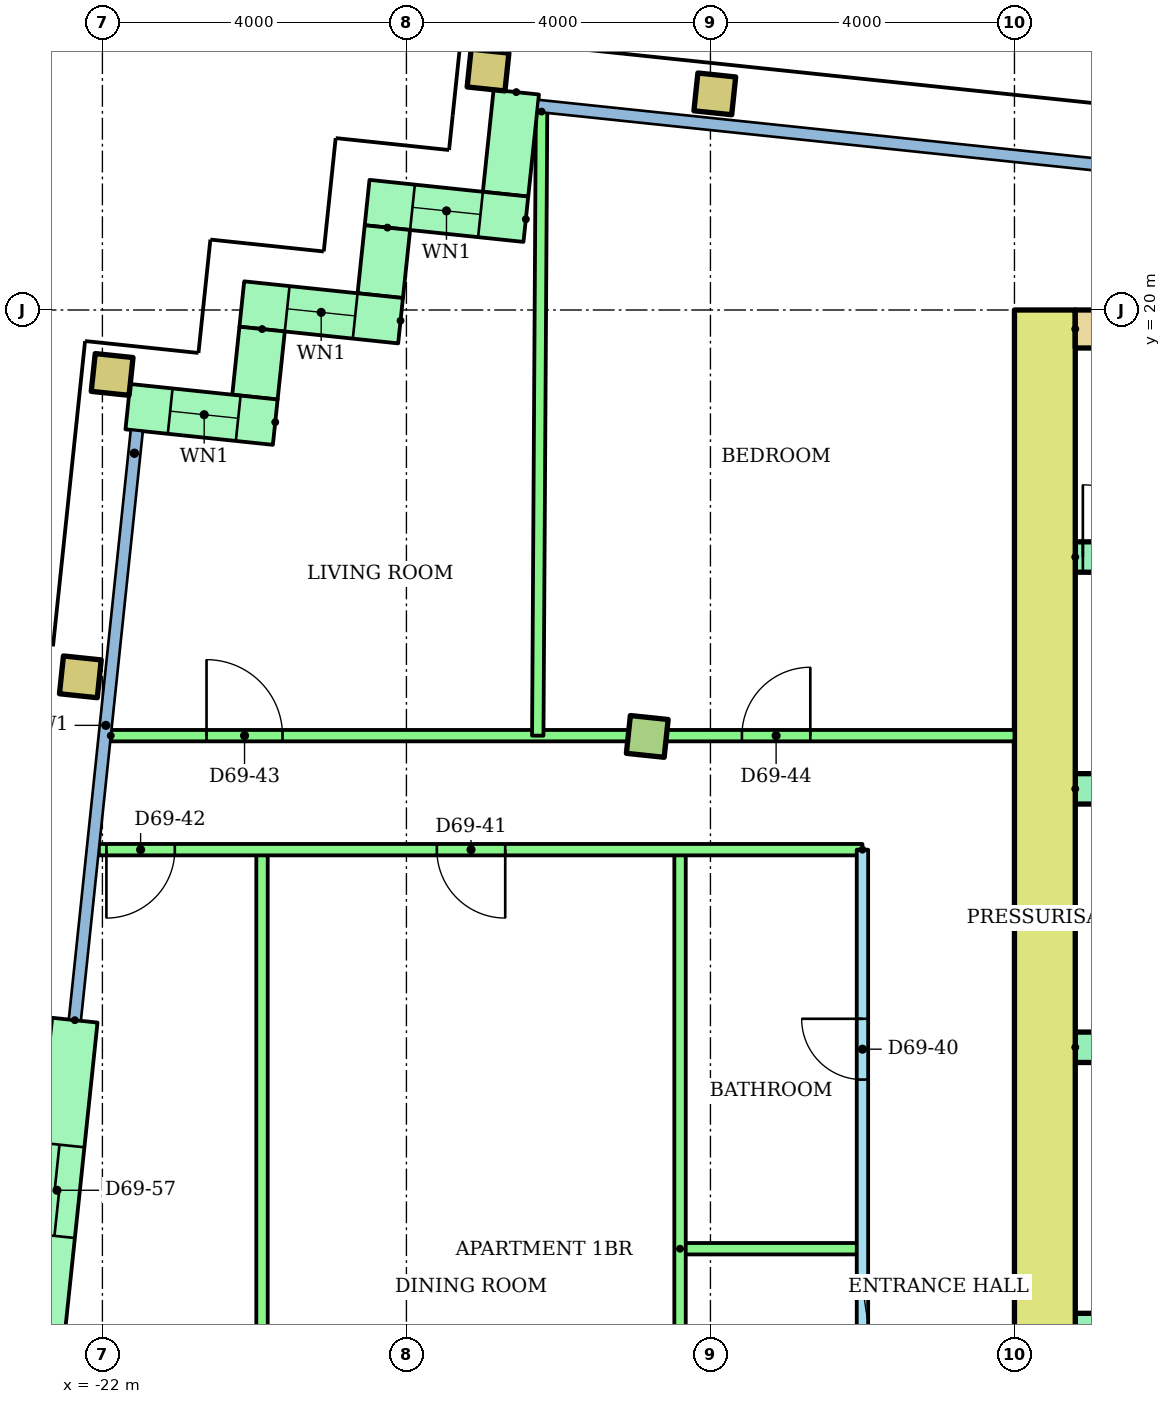
"""IFC4 building model, lengths in metres.
Left out: names, types, materials, properties, quantities, classifications, styles, units other than length and angle.
Written with IfcOpenShell. Run it as: python <this file> out.ifc"""

import sys

from ifc_helpers import new_model, si_unit, direction, frame, frame_2d, origin, origin_2d, place, context, subcontext, project, spatial, rectangle, hollow_rectangle, extrude, element, fill, save


model = new_model("IFC4")
c1 = context("Model", 3, precision=1e-05, world=origin(), true_north=direction((0.0, 1.0)))
c2 = subcontext(c1, "Body", "Model", "MODEL_VIEW")
j1 = project(units=[si_unit("LENGTHUNIT", "METRE"), si_unit("PLANEANGLEUNIT", "RADIAN")], contexts=[c1])
p1 = place(None, origin())
s1 = spatial("IfcSite", under=j1, at=p1, CompositionType="ELEMENT")
p2 = place(p1, origin())
s2 = spatial("IfcBuilding", under=s1, at=p2, CompositionType="ELEMENT")
p3 = place(p2, frame((0.0, 0.0, 265.9)))
s3 = spatial("IfcBuildingStorey", under=s2, at=p3, CompositionType="ELEMENT", Elevation=265.9)
p4 = place(p3, frame((-22.29, 15.174, 0.0), z_axis=(0.0, 0.0, 1.0), x_axis=(0.994521895368, -0.104528463268, 0.0)))
e1 = element("IfcColumn", 1, at=p4, inside=s3, PredefinedType="COLUMN", context=c2, shape_type="SweptSolid", body=[
    extrude(hollow_rectangle(XDim=0.5, YDim=0.5, WallThickness=0.025, at=origin_2d()), origin(), (0.0, 0.0, 1.0), 3.2),
])
p5 = place(p3, frame((-14.831, 14.39, 0.0), z_axis=(0.0, 0.0, 1.0), x_axis=(0.994521895368, -0.104528463268, 0.0)))
e2 = element("IfcColumn", 2, at=p5, inside=s3, PredefinedType="COLUMN", context=c2, shape_type="SweptSolid", body=[
    extrude(rectangle(XDim=0.5, YDim=0.5, at=origin_2d()), origin(), (0.0, 0.0, 1.0), 3.2),
])
for number, where, z_axis, x_axis in (
    (3, (-21.872, 19.152, 0.0), (0.0, 0.0, 1.0), (0.995, -0.105, 0.0)),
    (4, (-16.926, 23.157, 0.0), (0.0, 0.0, 1.0), (0.995, -0.105, 0.0)),
    (5, (-13.943, 22.843, 0.0), (0.0, 0.0, 1.0), (0.995, -0.105, 0.0)),
):
    element("IfcColumn", number, at=place(p3, frame(where, z_axis=z_axis, x_axis=x_axis)), inside=s3, PredefinedType="COLUMN", context=c2, shape_type="SweptSolid", body=[
        extrude(hollow_rectangle(XDim=0.5, YDim=0.5, WallThickness=0.025, at=origin_2d()), origin(), (0.0, 0.0, 1.0), 3.2),
    ])
p6 = place(p3, frame((-16.555, 22.866, 0.0), z_axis=(0.0, 0.0, 1.0), x_axis=(-0.104515354875, -0.994523273029, 0.0)))
e6 = element("IfcWall", 6, at=p6, inside=s3, PredefinedType="STANDARD", context=c2, shape_type="SweptSolid", body=[
    extrude(rectangle(XDim=1.35, YDim=0.6, at=frame_2d((0.675, 0.0))), origin(), (0.0, 0.0, 1.0), 2.92),
])
p7 = place(p3, frame((-16.429, 21.194, 0.0), z_axis=(0.0, 0.0, 1.0), x_axis=(-0.994522640205, 0.104521376379, 0.0)))
e7 = element("IfcWall", 7, at=p7, inside=s3, PredefinedType="STANDARD", context=c2, shape_type="SweptSolid", body=[
    extrude(rectangle(XDim=2.1, YDim=0.6, at=frame_2d((1.05, 0.0))), origin(), (0.0, 0.0, 1.0), 2.92),
])
p8 = place(p7, frame((0.6, 0.0, 0.9)))
e8 = element("IfcOpeningElement", 8, at=p8, cuts=e7, PredefinedType="OPENING", context=c2, shape_type="SweptSolid", body=[
    extrude(rectangle(XDim=0.9, YDim=1.5, at=frame_2d((0.45, 0.75))), frame((0.0, 0.31, 0.0), z_axis=(0.0, -1.0, 0.0), x_axis=(1.0, 0.0, 0.0)), (0.0, 0.0, 1.0), 0.62),
])
p9 = place(p3, frame((-18.25, 21.084, 0.0), z_axis=(0.0, 0.0, 1.0), x_axis=(-0.104416541099, -0.994533652495, 0.0)))
e9 = element("IfcWall", 9, at=p9, inside=s3, PredefinedType="STANDARD", context=c2, shape_type="SweptSolid", body=[
    extrude(rectangle(XDim=0.9, YDim=0.6, at=frame_2d((0.45, 0.0))), origin(), (0.0, 0.0, 1.0), 2.92),
])
p10 = place(p3, frame((-18.077, 19.859, 0.0), z_axis=(0.0, 0.0, 1.0), x_axis=(-0.994522640205, 0.104521376379, 0.0)))
e10 = element("IfcWall", 10, at=p10, inside=s3, PredefinedType="STANDARD", context=c2, shape_type="SweptSolid", body=[
    extrude(rectangle(XDim=2.1, YDim=0.6, at=frame_2d((1.05, 0.0))), origin(), (0.0, 0.0, 1.0), 2.92),
])
p11 = place(p10, frame((0.6, 0.0, 0.9)))
e11 = element("IfcOpeningElement", 11, at=p11, cuts=e10, PredefinedType="OPENING", context=c2, shape_type="SweptSolid", body=[
    extrude(rectangle(XDim=0.9, YDim=1.5, at=frame_2d((0.45, 0.75))), frame((0.0, 0.31, 0.0), z_axis=(0.0, -1.0, 0.0), x_axis=(1.0, 0.0, 0.0)), (0.0, 0.0, 1.0), 0.62),
])
p12 = place(p3, frame((-19.899, 19.749, 0.0), z_axis=(0.0, 0.0, 1.0), x_axis=(-0.104741284723, -0.994499503909, 0.0)))
e12 = element("IfcWall", 12, at=p12, inside=s3, PredefinedType="STANDARD", context=c2, shape_type="SweptSolid", body=[
    extrude(rectangle(XDim=0.9, YDim=0.6, at=frame_2d((0.45, 0.0))), origin(), (0.0, 0.0, 1.0), 2.92),
])
p13 = place(p3, frame((-19.726, 18.524, 0.0), z_axis=(0.0, 0.0, 1.0), x_axis=(-0.994534226826, 0.104411070641, 0.0)))
e13 = element("IfcWall", 13, at=p13, inside=s3, PredefinedType="STANDARD", context=c2, shape_type="SweptSolid", body=[
    extrude(rectangle(XDim=1.95, YDim=0.6, at=frame_2d((0.975, 0.0))), origin(), (0.0, 0.0, 1.0), 2.92),
])
p14 = place(p13, frame((0.49, 0.0, 0.9)))
e14 = element("IfcOpeningElement", 14, at=p14, cuts=e13, PredefinedType="OPENING", context=c2, shape_type="SweptSolid", body=[
    extrude(rectangle(XDim=0.9, YDim=1.5, at=frame_2d((0.45, 0.75))), frame((0.0, 0.31, 0.0), z_axis=(0.0, -1.0, 0.0), x_axis=(1.0, 0.0, 0.0)), (0.0, 0.0, 1.0), 0.62),
])
p15 = place(p3, frame((-22.363, 10.657, 0.0), z_axis=(0.0, 0.0, 1.0), x_axis=(-0.104492739125, -0.994525649478, 0.0)))
e15 = element("IfcWall", 15, at=p15, inside=s3, PredefinedType="STANDARD", context=c2, shape_type="SweptSolid", body=[
    extrude(rectangle(XDim=4.5, YDim=0.6, at=frame_2d((2.25, 0.0))), origin(), (0.0, 0.0, 1.0), 2.92),
])
p16 = place(p15, frame((1.65, 0.0, 0.0)))
e16 = element("IfcOpeningElement", 16, at=p16, cuts=e15, PredefinedType="OPENING", context=c2, shape_type="SweptSolid", body=[
    extrude(rectangle(XDim=1.2, YDim=2.1, at=frame_2d((0.6, 1.05))), frame((0.0, 0.31, 0.0), z_axis=(0.0, -1.0, 0.0), x_axis=(1.0, 0.0, 0.0)), (0.0, 0.0, 1.0), 0.62),
])
p17 = place(p3, frame((-9.6, 6.4, 0.0), z_axis=(0.0, 0.0, 1.0), x_axis=(0.0, 1.0, 0.0)))
e17 = element("IfcWall", 17, at=p17, inside=s3, PredefinedType="SHEAR", context=c2, shape_type="SweptSolid", body=[
    extrude(rectangle(XDim=13.6, YDim=0.8, at=frame_2d((6.8, 0.0))), origin(), (0.0, 0.0, 1.0), 2.92),
])
p18 = place(p3, frame((-9.2, 19.75, 0.0)))
e18 = element("IfcWall", 18, at=p18, inside=s3, PredefinedType="SHEAR", context=c2, shape_type="SweptSolid", body=[
    extrude(rectangle(XDim=18.4, YDim=0.5, at=frame_2d((9.2, 0.0))), origin(), (0.0, 0.0, 1.0), 2.92),
])
p19 = place(p3, frame((-9.2, 6.6, 0.0)))
e19 = element("IfcWall", 19, at=p19, inside=s3, PredefinedType="SHEAR", context=c2, shape_type="SweptSolid", body=[
    extrude(rectangle(XDim=18.4, YDim=0.4, at=frame_2d((9.2, 0.0))), origin(), (0.0, 0.0, 1.0), 2.92),
])
p20 = place(p19, frame((8.3, 0.0, 0.0)))
e20 = element("IfcOpeningElement", 20, at=p20, cuts=e19, PredefinedType="OPENING", context=c2, shape_type="SweptSolid", body=[
    extrude(rectangle(XDim=1.8, YDim=2.1, at=frame_2d((0.9, 1.05))), frame((0.0, 0.21, 0.0), z_axis=(0.0, -1.0, 0.0), x_axis=(1.0, 0.0, 0.0)), (0.0, 0.0, 1.0), 0.42),
])
p21 = place(p19, frame((3.8, 0.0, 0.0)))
e21 = element("IfcOpeningElement", 21, at=p21, cuts=e19, PredefinedType="OPENING", context=c2, shape_type="SweptSolid", body=[
    extrude(rectangle(XDim=1.8, YDim=2.1, at=frame_2d((0.9, 1.05))), frame((0.0, 0.21, 0.0), z_axis=(0.0, -1.0, 0.0), x_axis=(1.0, 0.0, 0.0)), (0.0, 0.0, 1.0), 0.42),
])
p22 = place(p19, frame((12.8, 0.0, 0.0)))
e22 = element("IfcOpeningElement", 22, at=p22, cuts=e19, PredefinedType="OPENING", context=c2, shape_type="SweptSolid", body=[
    extrude(rectangle(XDim=1.8, YDim=2.1, at=frame_2d((0.9, 1.05))), frame((0.0, 0.21, 0.0), z_axis=(0.0, -1.0, 0.0), x_axis=(1.0, 0.0, 0.0)), (0.0, 0.0, 1.0), 0.42),
])
p23 = place(p3, frame((-9.2, 10.3, 0.0)))
e23 = element("IfcWall", 23, at=p23, inside=s3, PredefinedType="SHEAR", context=c2, shape_type="SweptSolid", body=[
    extrude(rectangle(XDim=8.0, YDim=0.4, at=frame_2d((4.0, 0.0))), origin(), (0.0, 0.0, 1.0), 2.92),
])
p24 = place(p23, frame((3.35, 0.0, 0.0)))
e24 = element("IfcOpeningElement", 24, at=p24, cuts=e23, PredefinedType="OPENING", context=c2, shape_type="SweptSolid", body=[
    extrude(rectangle(XDim=1.1, YDim=2.1, at=frame_2d((0.55, 1.05))), frame((0.0, 0.21, 0.0), z_axis=(0.0, -1.0, 0.0), x_axis=(1.0, 0.0, 0.0)), (0.0, 0.0, 1.0), 0.42),
])
p25 = place(p23, frame((6.083, 0.0, 0.0)))
e25 = element("IfcOpeningElement", 25, at=p25, cuts=e23, PredefinedType="OPENING", context=c2, shape_type="SweptSolid", body=[
    extrude(rectangle(XDim=1.1, YDim=2.1, at=frame_2d((0.55, 1.05))), frame((0.0, 0.21, 0.0), z_axis=(0.0, -1.0, 0.0), x_axis=(1.0, 0.0, 0.0)), (0.0, 0.0, 1.0), 0.42),
])
p26 = place(p23, frame((0.917, 0.0, 0.0)))
e26 = element("IfcOpeningElement", 26, at=p26, cuts=e23, PredefinedType="OPENING", context=c2, shape_type="SweptSolid", body=[
    extrude(rectangle(XDim=1.0, YDim=2.1, at=frame_2d((0.5, 1.05))), frame((0.0, 0.21, 0.0), z_axis=(0.0, -1.0, 0.0), x_axis=(1.0, 0.0, 0.0)), (0.0, 0.0, 1.0), 0.42),
])
p27 = place(p3, frame((-9.2, 13.7, 0.0)))
e27 = element("IfcWall", 27, at=p27, inside=s3, PredefinedType="SHEAR", context=c2, shape_type="SweptSolid", body=[
    extrude(rectangle(XDim=8.0, YDim=0.4, at=frame_2d((4.0, 0.0))), origin(), (0.0, 0.0, 1.0), 2.92),
])
p28 = place(p3, frame((-9.2, 16.75, 0.0)))
e28 = element("IfcWall", 28, at=p28, inside=s3, PredefinedType="SHEAR", context=c2, shape_type="SweptSolid", body=[
    extrude(rectangle(XDim=18.4, YDim=0.4, at=frame_2d((9.2, 0.0))), origin(), (0.0, 0.0, 1.0), 2.92),
])
p29 = place(p28, frame((0.1, 0.0, 0.0)))
e29 = element("IfcOpeningElement", 29, at=p29, cuts=e28, PredefinedType="OPENING", context=c2, shape_type="SweptSolid", body=[
    extrude(rectangle(XDim=0.95, YDim=2.1, at=frame_2d((0.475, 1.05))), frame((0.0, 0.21, 0.0), z_axis=(0.0, -1.0, 0.0), x_axis=(1.0, 0.0, 0.0)), (0.0, 0.0, 1.0), 0.42),
])
p30 = place(p28, frame((6.1, 0.0, 0.0)))
e30 = element("IfcOpeningElement", 30, at=p30, cuts=e28, PredefinedType="OPENING", context=c2, shape_type="SweptSolid", body=[
    extrude(rectangle(XDim=0.95, YDim=2.1, at=frame_2d((0.475, 1.05))), frame((0.0, 0.21, 0.0), z_axis=(0.0, -1.0, 0.0), x_axis=(1.0, 0.0, 0.0)), (0.0, 0.0, 1.0), 0.42),
])
p31 = place(p28, frame((12.1, 0.0, 0.0)))
e31 = element("IfcOpeningElement", 31, at=p31, cuts=e28, PredefinedType="OPENING", context=c2, shape_type="SweptSolid", body=[
    extrude(rectangle(XDim=0.95, YDim=2.1, at=frame_2d((0.475, 1.05))), frame((0.0, 0.21, 0.0), z_axis=(0.0, -1.0, 0.0), x_axis=(1.0, 0.0, 0.0)), (0.0, 0.0, 1.0), 0.42),
])
p32 = place(p3, frame((-12.0, 1.4, 0.0), z_axis=(0.0, 0.0, 1.0), x_axis=(0.0, 1.0, 0.0)))
e32 = element("IfcWall", 32, at=p32, inside=s3, PredefinedType="PARTITIONING", context=c2, shape_type="SweptSolid", body=[
    extrude(rectangle(XDim=11.5, YDim=0.15, at=frame_2d((5.75, 0.0))), origin(), (0.0, 0.0, 1.0), 2.4),
])
p33 = place(p32, frame((2.675, 0.0, 0.0)))
e33 = element("IfcOpeningElement", 33, at=p33, cuts=e32, PredefinedType="OPENING", context=c2, shape_type="SweptSolid", body=[
    extrude(rectangle(XDim=0.9, YDim=2.1, at=frame_2d((0.45, 1.05))), frame((0.0, 0.085, 0.0), z_axis=(0.0, -1.0, 0.0), x_axis=(1.0, 0.0, 0.0)), (0.0, 0.0, 1.0), 0.17),
])
p34 = place(p32, frame((8.475, 0.0, 0.0)))
e34 = element("IfcOpeningElement", 34, at=p34, cuts=e32, PredefinedType="OPENING", context=c2, shape_type="SweptSolid", body=[
    extrude(rectangle(XDim=0.8, YDim=2.1, at=frame_2d((0.4, 1.05))), frame((0.0, 0.085, 0.0), z_axis=(0.0, -1.0, 0.0), x_axis=(1.0, 0.0, 0.0)), (0.0, 0.0, 1.0), 0.17),
])
p35 = place(p3, frame((-14.4, 7.65, 0.0)))
e35 = element("IfcWall", 35, at=p35, inside=s3, PredefinedType="PARTITIONING", context=c2, shape_type="SweptSolid", body=[
    extrude(rectangle(XDim=2.4, YDim=0.15, at=frame_2d((1.2, 0.0))), origin(), (0.0, 0.0, 1.0), 2.4),
])
for number, where, z_axis, x_axis in (
    (36, (-14.4, 1.4, 0.0), (0.0, 0.0, 1.0), (0.0, 1.0, 0.0)),
    (37, (-19.9, 1.4, 0.0), (0.0, 0.0, 1.0), (0.0, 1.0, 0.0)),
):
    element("IfcWall", number, at=place(p3, frame(where, z_axis=z_axis, x_axis=x_axis)), inside=s3, PredefinedType="PARTITIONING", context=c2, shape_type="SweptSolid", body=[
        extrude(rectangle(XDim=11.5, YDim=0.15, at=frame_2d((5.75, 0.0))), origin(), (0.0, 0.0, 1.0), 2.4),
    ])
p36 = place(p3, frame((-12.0, 12.9, 0.0), z_axis=(0.0, 0.0, 1.0), x_axis=(-1.0, 0.0, 0.0)))
e38 = element("IfcWall", 38, at=p36, inside=s3, PredefinedType="PARTITIONING", context=c2, shape_type="SweptSolid", body=[
    extrude(rectangle(XDim=10.047, YDim=0.15, at=frame_2d((5.024, 0.0))), origin(), (0.0, 0.0, 1.0), 2.4),
])
p37 = place(p36, frame((4.7, 0.0, 0.0)))
e39 = element("IfcOpeningElement", 39, at=p37, cuts=e38, PredefinedType="OPENING", context=c2, shape_type="SweptSolid", body=[
    extrude(rectangle(XDim=0.9, YDim=2.1, at=frame_2d((0.45, 1.05))), frame((0.0, 0.085, 0.0), z_axis=(0.0, -1.0, 0.0), x_axis=(1.0, 0.0, 0.0)), (0.0, 0.0, 1.0), 0.17),
])
p38 = place(p36, frame((9.047, 0.0, 0.0)))
e40 = element("IfcOpeningElement", 40, at=p38, cuts=e38, PredefinedType="OPENING", context=c2, shape_type="SweptSolid", body=[
    extrude(rectangle(XDim=0.9, YDim=2.1, at=frame_2d((0.45, 1.05))), frame((0.0, 0.085, 0.0), z_axis=(0.0, -1.0, 0.0), x_axis=(1.0, 0.0, 0.0)), (0.0, 0.0, 1.0), 0.17),
])
p39 = place(p3, frame((-21.89, 14.4, 0.0)))
e41 = element("IfcWall", 41, at=p39, inside=s3, PredefinedType="PARTITIONING", context=c2, shape_type="SweptSolid", body=[
    extrude(rectangle(XDim=11.89, YDim=0.15, at=frame_2d((5.945, 0.0))), origin(), (0.0, 0.0, 1.0), 2.4),
])
p40 = place(p39, frame((1.26, 0.0, 0.0)))
e42 = element("IfcOpeningElement", 42, at=p40, cuts=e41, PredefinedType="OPENING", context=c2, shape_type="SweptSolid", body=[
    extrude(rectangle(XDim=1.0, YDim=2.1, at=frame_2d((0.5, 1.05))), frame((0.0, 0.085, 0.0), z_axis=(0.0, -1.0, 0.0), x_axis=(1.0, 0.0, 0.0)), (0.0, 0.0, 1.0), 0.17),
])
p41 = place(p39, frame((8.304, 0.0, 0.0)))
e43 = element("IfcOpeningElement", 43, at=p41, cuts=e41, PredefinedType="OPENING", context=c2, shape_type="SweptSolid", body=[
    extrude(rectangle(XDim=0.9, YDim=2.1, at=frame_2d((0.45, 1.05))), frame((0.0, 0.085, 0.0), z_axis=(0.0, -1.0, 0.0), x_axis=(1.0, 0.0, 0.0)), (0.0, 0.0, 1.0), 0.17),
])
p42 = place(p3, frame((-16.222, 22.61, 0.0), z_axis=(0.0, 0.0, 1.0), x_axis=(-0.006095634594, -0.999981421447, 0.0)))
e44 = element("IfcWall", 44, at=p42, inside=s3, PredefinedType="PARTITIONING", context=c2, shape_type="SweptSolid", body=[
    extrude(rectangle(XDim=8.211, YDim=0.15, at=frame_2d((4.105, 0.0))), origin(), (0.0, 0.0, 1.0), 2.4),
])
p43 = place(p8, origin())
e45 = element("IfcWindow", 45, at=p43, inside=s3, PartitioningType="SINGLE_PANEL", PredefinedType="WINDOW", context=c2, shape_type="SweptSolid", body=[
    extrude(rectangle(XDim=0.9, YDim=1.5, at=frame_2d((0.45, 0.75))), frame((0.0, 0.03, 0.0), z_axis=(0.0, -1.0, 0.0), x_axis=(1.0, 0.0, 0.0)), (0.0, 0.0, 1.0), 0.06),
])
fill(e8, e45)
p44 = place(p11, origin())
e46 = element("IfcWindow", 46, at=p44, inside=s3, PartitioningType="SINGLE_PANEL", PredefinedType="WINDOW", context=c2, shape_type="SweptSolid", body=[
    extrude(rectangle(XDim=0.9, YDim=1.5, at=frame_2d((0.45, 0.75))), frame((0.0, 0.03, 0.0), z_axis=(0.0, -1.0, 0.0), x_axis=(1.0, 0.0, 0.0)), (0.0, 0.0, 1.0), 0.06),
])
fill(e11, e46)
p45 = place(p14, origin())
e47 = element("IfcWindow", 47, at=p45, inside=s3, PartitioningType="SINGLE_PANEL", PredefinedType="WINDOW", context=c2, shape_type="SweptSolid", body=[
    extrude(rectangle(XDim=0.9, YDim=1.5, at=frame_2d((0.45, 0.75))), frame((0.0, 0.03, 0.0), z_axis=(0.0, -1.0, 0.0), x_axis=(1.0, 0.0, 0.0)), (0.0, 0.0, 1.0), 0.06),
])
fill(e14, e47)
p46 = place(p29, origin())
e48 = element("IfcDoor", 48, at=p46, inside=s3, OperationType="SINGLE_SWING_LEFT", PredefinedType="DOOR", context=c2, shape_type="SweptSolid", body=[
    extrude(rectangle(XDim=0.95, YDim=2.1, at=frame_2d((0.475, 1.05))), frame((0.0, 0.025, 0.0), z_axis=(0.0, -1.0, 0.0), x_axis=(1.0, 0.0, 0.0)), (0.0, 0.0, 1.0), 0.05),
])
fill(e29, e48)
p47 = place(p34, origin())
e49 = element("IfcDoor", 49, at=p47, inside=s3, OperationType="SINGLE_SWING_RIGHT", PredefinedType="DOOR", context=c2, shape_type="SweptSolid", body=[
    extrude(rectangle(XDim=0.8, YDim=2.1, at=frame_2d((0.4, 1.05))), frame((0.0, 0.025, 0.0), z_axis=(0.0, -1.0, 0.0), x_axis=(1.0, 0.0, 0.0)), (0.0, 0.0, 1.0), 0.05),
])
fill(e34, e49)
p48 = place(p37, origin())
e50 = element("IfcDoor", 50, at=p48, inside=s3, OperationType="SINGLE_SWING_LEFT", PredefinedType="DOOR", context=c2, shape_type="SweptSolid", body=[
    extrude(rectangle(XDim=0.9, YDim=2.1, at=frame_2d((0.45, 1.05))), frame((0.0, 0.025, 0.0), z_axis=(0.0, -1.0, 0.0), x_axis=(1.0, 0.0, 0.0)), (0.0, 0.0, 1.0), 0.05),
])
fill(e39, e50)
p49 = place(p38, origin())
e51 = element("IfcDoor", 51, at=p49, inside=s3, OperationType="SINGLE_SWING_RIGHT", PredefinedType="DOOR", context=c2, shape_type="SweptSolid", body=[
    extrude(rectangle(XDim=0.9, YDim=2.1, at=frame_2d((0.45, 1.05))), frame((0.0, 0.025, 0.0), z_axis=(0.0, -1.0, 0.0), x_axis=(1.0, 0.0, 0.0)), (0.0, 0.0, 1.0), 0.05),
])
fill(e40, e51)
p50 = place(p40, origin())
e52 = element("IfcDoor", 52, at=p50, inside=s3, OperationType="SINGLE_SWING_LEFT", PredefinedType="DOOR", context=c2, shape_type="SweptSolid", body=[
    extrude(rectangle(XDim=1.0, YDim=2.1, at=frame_2d((0.5, 1.05))), frame((0.0, 0.025, 0.0), z_axis=(0.0, -1.0, 0.0), x_axis=(1.0, 0.0, 0.0)), (0.0, 0.0, 1.0), 0.05),
])
fill(e42, e52)
p51 = place(p41, origin())
e53 = element("IfcDoor", 53, at=p51, inside=s3, OperationType="SINGLE_SWING_RIGHT", PredefinedType="DOOR", context=c2, shape_type="SweptSolid", body=[
    extrude(rectangle(XDim=0.9, YDim=2.1, at=frame_2d((0.45, 1.05))), frame((0.0, 0.025, 0.0), z_axis=(0.0, -1.0, 0.0), x_axis=(1.0, 0.0, 0.0)), (0.0, 0.0, 1.0), 0.05),
])
fill(e43, e53)
p52 = place(p16, origin())
e54 = element("IfcDoor", 54, at=p52, inside=s3, OperationType="SLIDING_TO_LEFT", PredefinedType="DOOR", context=c2, shape_type="SweptSolid", body=[
    extrude(rectangle(XDim=1.2, YDim=2.1, at=frame_2d((0.6, 1.05))), frame((0.0, 0.025, 0.0), z_axis=(0.0, -1.0, 0.0), x_axis=(1.0, 0.0, 0.0)), (0.0, 0.0, 1.0), 0.05),
])
fill(e16, e54)
save(model, sys.argv[1])
